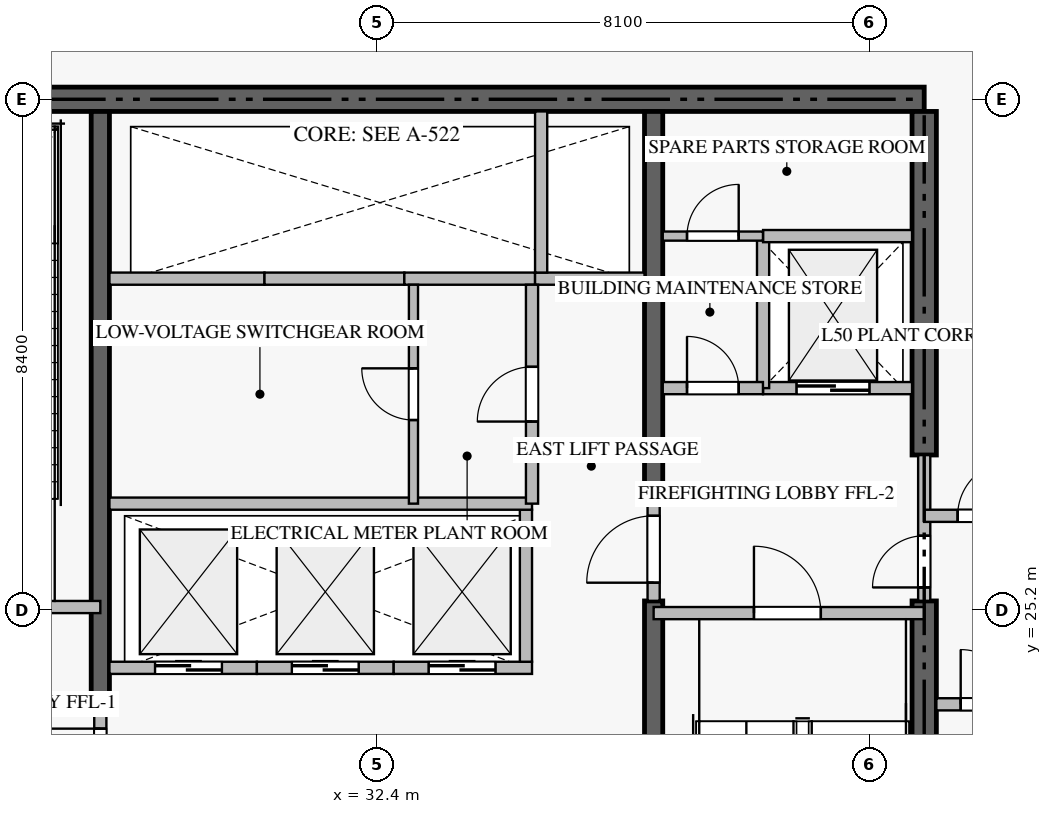
"""IFC4 building model, lengths in metres.
Left out: names, types, materials, properties, quantities, classifications, styles, units other than length and angle.
Written with IfcOpenShell. Run it as: python <this file> out.ifc"""

import sys

from ifc_helpers import new_model, si_unit, direction, frame, frame_2d, origin, place, context, subcontext, project, spatial, rectangle, extrude, source, transform, mapped, element, fill, save


model = new_model("IFC4")
c1 = context("Model", 3, precision=1e-05, world=origin(), true_north=direction((0.0, 1.0)))
c2 = subcontext(c1, "Body", "Model", "MODEL_VIEW")
j1 = project(units=[si_unit("LENGTHUNIT", "METRE"), si_unit("PLANEANGLEUNIT", "RADIAN")], contexts=[c1])
p1 = place(None, origin())
s1 = spatial("IfcSite", under=j1, at=p1, CompositionType="ELEMENT")
p2 = place(p1, origin())
s2 = spatial("IfcBuilding", under=s1, at=p2, CompositionType="ELEMENT")
p3 = place(p2, frame((0.0, 0.0, 198.9)))
s3 = spatial("IfcBuildingStorey", under=s2, at=p3, CompositionType="ELEMENT", Elevation=198.9)
p4 = place(p3, frame((41.4, 33.6, -0.44), z_axis=(0.0, 0.0, 1.0), x_axis=(-1.0, 0.0, 0.0)))
e1 = element("IfcWall", 1, at=p4, inside=s3, PredefinedType="SHEAR", context=c2, shape_type="SweptSolid", body=[
    extrude(rectangle(XDim=18.0, YDim=0.4, at=frame_2d((9.0, 0.0))), origin(), (0.0, 0.0, 1.0), 6.078),
])
p5 = place(p3, frame((41.4, 17.0, -0.44), z_axis=(0.0, 0.0, 1.0), x_axis=(0.0, 1.0, 0.0)))
e2 = element("IfcWall", 2, at=p5, inside=s3, PredefinedType="SHEAR", context=c2, shape_type="SweptSolid", body=[
    extrude(rectangle(XDim=8.35, YDim=0.4, at=frame_2d((4.175, 0.0))), origin(), (0.0, 0.0, 1.0), 6.078),
])
p6 = place(p3, frame((41.4, 27.75, -0.44), z_axis=(0.0, 0.0, 1.0), x_axis=(0.0, 1.0, 0.0)))
e3 = element("IfcWall", 3, at=p6, inside=s3, PredefinedType="SHEAR", context=c2, shape_type="SweptSolid", body=[
    extrude(rectangle(XDim=5.65, YDim=0.4, at=frame_2d((2.825, 0.0))), origin(), (0.0, 0.0, 1.0), 6.078),
])
p7 = place(p3, frame((27.85, 23.55, -0.44), z_axis=(0.0, 0.0, 1.0), x_axis=(0.0, 1.0, 0.0)))
e4 = element("IfcWall", 4, at=p7, inside=s3, PredefinedType="SHEAR", context=c2, shape_type="SweptSolid", body=[
    extrude(rectangle(XDim=9.85, YDim=0.3, at=frame_2d((4.925, 0.0))), origin(), (0.0, 0.0, 1.0), 6.078),
])
p8 = place(p3, frame((36.95, 17.0, -0.44), z_axis=(0.0, 0.0, 1.0), x_axis=(0.0, 1.0, 0.0)))
e5 = element("IfcWall", 5, at=p8, inside=s3, PredefinedType="SHEAR", context=c2, shape_type="SweptSolid", body=[
    extrude(rectangle(XDim=8.35, YDim=0.3, at=frame_2d((4.175, 0.0))), origin(), (0.0, 0.0, 1.0), 6.078),
])
p9 = place(p3, frame((36.95, 27.05, -0.44), z_axis=(0.0, 0.0, 1.0), x_axis=(0.0, 1.0, 0.0)))
e6 = element("IfcWall", 6, at=p9, inside=s3, PredefinedType="SHEAR", context=c2, shape_type="SweptSolid", body=[
    extrude(rectangle(XDim=6.35, YDim=0.3, at=frame_2d((3.175, 0.0))), origin(), (0.0, 0.0, 1.0), 6.078),
])
p10 = place(p3, frame((23.4, 25.25, 0.0), z_axis=(0.0, 0.0, 1.0), x_axis=(1.0, 0.0, 0.0)))
e7 = element("IfcWall", 7, at=p10, inside=s3, PredefinedType="STANDARD", context=c2, shape_type="SweptSolid", body=[
    extrude(rectangle(XDim=4.45, YDim=0.2, at=frame_2d((2.225, 0.0))), origin(), (0.0, 0.0, 1.0), 5.64),
])
p11 = place(p10, frame((1.65, 0.0, 0.0)))
e8 = element("IfcOpeningElement", 8, at=p11, cuts=e7, PredefinedType="OPENING", context=c2, shape_type="SweptSolid", body=[
    extrude(rectangle(XDim=1.1, YDim=2.15, at=frame_2d((0.55, 1.075))), frame((0.0, 0.11, 0.0), z_axis=(0.0, -1.0, 0.0), x_axis=(1.0, 0.0, 0.0)), (0.0, 0.0, 1.0), 0.22),
])
p12 = place(p3, frame((36.95, 25.15, 0.0), z_axis=(0.0, 0.0, 1.0), x_axis=(1.0, 0.0, 0.0)))
e9 = element("IfcWall", 9, at=p12, inside=s3, PredefinedType="STANDARD", context=c2, shape_type="SweptSolid", body=[
    extrude(rectangle(XDim=4.45, YDim=0.2, at=frame_2d((2.225, 0.0))), origin(), (0.0, 0.0, 1.0), 5.64),
])
p13 = place(p12, frame((1.65, 0.0, 0.0)))
e10 = element("IfcOpeningElement", 10, at=p13, cuts=e9, PredefinedType="OPENING", context=c2, shape_type="SweptSolid", body=[
    extrude(rectangle(XDim=1.1, YDim=2.15, at=frame_2d((0.55, 1.075))), frame((0.0, 0.11, 0.0), z_axis=(0.0, -1.0, 0.0), x_axis=(1.0, 0.0, 0.0)), (0.0, 0.0, 1.0), 0.22),
])
p14 = place(p3, frame((38.75, 28.85, 0.0), z_axis=(0.0, 0.0, 1.0), x_axis=(1.0, 0.0, 0.0)))
e11 = element("IfcWall", 11, at=p14, inside=s3, PredefinedType="STANDARD", context=c2, shape_type="SweptSolid", body=[
    extrude(rectangle(XDim=2.45, YDim=0.2, at=frame_2d((1.225, 0.0))), origin(), (0.0, 0.0, 1.0), 5.64),
])
p15 = place(p14, frame((0.55, 0.0, 0.0)))
e12 = element("IfcOpeningElement", 12, at=p15, cuts=e11, PredefinedType="OPENING", context=c2, shape_type="SweptSolid", body=[
    extrude(rectangle(XDim=1.2, YDim=2.2, at=frame_2d((0.6, 1.1))), frame((0.0, 0.11, 0.0), z_axis=(0.0, -1.0, 0.0), x_axis=(1.0, 0.0, 0.0)), (0.0, 0.0, 1.0), 0.22),
])
p16 = place(p3, frame((28.0, 24.25, 0.0), z_axis=(0.0, 0.0, 1.0), x_axis=(1.0, 0.0, 0.0)))
e13 = element("IfcWall", 13, at=p16, inside=s3, PredefinedType="STANDARD", context=c2, shape_type="SweptSolid", body=[
    extrude(rectangle(XDim=2.425, YDim=0.2, at=frame_2d((1.212, 0.0))), origin(), (0.0, 0.0, 1.0), 5.64),
])
p17 = place(p16, frame((0.75, 0.0, 0.0)))
e14 = element("IfcOpeningElement", 14, at=p17, cuts=e13, PredefinedType="OPENING", context=c2, shape_type="SweptSolid", body=[
    extrude(rectangle(XDim=1.1, YDim=2.2, at=frame_2d((0.55, 1.1))), frame((0.0, 0.11, 0.0), z_axis=(0.0, -1.0, 0.0), x_axis=(1.0, 0.0, 0.0)), (0.0, 0.0, 1.0), 0.22),
])
p18 = place(p3, frame((30.425, 24.25, 0.0), z_axis=(0.0, 0.0, 1.0), x_axis=(1.0, 0.0, 0.0)))
e15 = element("IfcWall", 15, at=p18, inside=s3, PredefinedType="STANDARD", context=c2, shape_type="SweptSolid", body=[
    extrude(rectangle(XDim=2.25, YDim=0.2, at=frame_2d((1.125, 0.0))), origin(), (0.0, 0.0, 1.0), 5.64),
])
p19 = place(p18, frame((0.575, 0.0, 0.0)))
e16 = element("IfcOpeningElement", 16, at=p19, cuts=e15, PredefinedType="OPENING", context=c2, shape_type="SweptSolid", body=[
    extrude(rectangle(XDim=1.1, YDim=2.2, at=frame_2d((0.55, 1.1))), frame((0.0, 0.11, 0.0), z_axis=(0.0, -1.0, 0.0), x_axis=(1.0, 0.0, 0.0)), (0.0, 0.0, 1.0), 0.22),
])
p20 = place(p3, frame((32.675, 24.25, 0.0), z_axis=(0.0, 0.0, 1.0), x_axis=(1.0, 0.0, 0.0)))
e17 = element("IfcWall", 17, at=p20, inside=s3, PredefinedType="STANDARD", context=c2, shape_type="SweptSolid", body=[
    extrude(rectangle(XDim=2.275, YDim=0.2, at=frame_2d((1.137, 0.0))), origin(), (0.0, 0.0, 1.0), 5.64),
])
p21 = place(p20, frame((0.575, 0.0, 0.0)))
e18 = element("IfcOpeningElement", 18, at=p21, cuts=e17, PredefinedType="OPENING", context=c2, shape_type="SweptSolid", body=[
    extrude(rectangle(XDim=1.1, YDim=2.2, at=frame_2d((0.55, 1.1))), frame((0.0, 0.11, 0.0), z_axis=(0.0, -1.0, 0.0), x_axis=(1.0, 0.0, 0.0)), (0.0, 0.0, 1.0), 0.22),
])
p22 = place(p3, frame((34.85, 24.35, 0.0), z_axis=(0.0, 0.0, 1.0), x_axis=(0.0, 1.0, 0.0)))
e19 = element("IfcWall", 19, at=p22, inside=s3, PredefinedType="STANDARD", context=c2, shape_type="SweptSolid", body=[
    extrude(rectangle(XDim=2.5, YDim=0.2, at=frame_2d((1.25, 0.0))), origin(), (0.0, 0.0, 1.0), 5.64),
])
p23 = place(p3, frame((28.0, 30.65, 0.0), z_axis=(0.0, 0.0, 1.0), x_axis=(1.0, 0.0, 0.0)))
e20 = element("IfcWall", 20, at=p23, inside=s3, PredefinedType="STANDARD", context=c2, shape_type="SweptSolid", body=[
    extrude(rectangle(XDim=2.55, YDim=0.2, at=frame_2d((1.275, 0.0))), origin(), (0.0, 0.0, 1.0), 5.64),
])
p24 = place(p3, frame((30.55, 30.65, 0.0), z_axis=(0.0, 0.0, 1.0), x_axis=(1.0, 0.0, 0.0)))
e21 = element("IfcWall", 21, at=p24, inside=s3, PredefinedType="STANDARD", context=c2, shape_type="SweptSolid", body=[
    extrude(rectangle(XDim=2.3, YDim=0.2, at=frame_2d((1.15, 0.0))), origin(), (0.0, 0.0, 1.0), 5.64),
])
p25 = place(p3, frame((32.85, 30.65, 0.0), z_axis=(0.0, 0.0, 1.0), x_axis=(1.0, 0.0, 0.0)))
e22 = element("IfcWall", 22, at=p25, inside=s3, PredefinedType="STANDARD", context=c2, shape_type="SweptSolid", body=[
    extrude(rectangle(XDim=2.15, YDim=0.2, at=frame_2d((1.075, 0.0))), origin(), (0.0, 0.0, 1.0), 5.64),
])
p26 = place(p3, frame((35.0, 30.65, 0.0), z_axis=(0.0, 0.0, 1.0), x_axis=(1.0, 0.0, 0.0)))
e23 = element("IfcWall", 23, at=p26, inside=s3, PredefinedType="STANDARD", context=c2, shape_type="SweptSolid", body=[
    extrude(rectangle(XDim=1.8, YDim=0.2, at=frame_2d((0.9, 0.0))), origin(), (0.0, 0.0, 1.0), 5.64),
])
p27 = place(p3, frame((35.1, 30.75, 0.0), z_axis=(0.0, 0.0, 1.0), x_axis=(0.0, 1.0, 0.0)))
e24 = element("IfcWall", 24, at=p27, inside=s3, PredefinedType="STANDARD", context=c2, shape_type="SweptSolid", body=[
    extrude(rectangle(XDim=2.65, YDim=0.2, at=frame_2d((1.325, 0.0))), origin(), (0.0, 0.0, 1.0), 5.64),
])
p28 = place(p3, frame((38.75, 28.85, 0.0), z_axis=(0.0, 0.0, 1.0), x_axis=(0.0, 1.0, 0.0)))
e25 = element("IfcWall", 25, at=p28, inside=s3, PredefinedType="STANDARD", context=c2, shape_type="SweptSolid", body=[
    extrude(rectangle(XDim=2.5, YDim=0.2, at=frame_2d((1.25, 0.0))), origin(), (0.0, 0.0, 1.0), 5.64),
])
p29 = place(p3, frame((38.75, 31.35, 0.0), z_axis=(0.0, 0.0, 1.0), x_axis=(1.0, 0.0, 0.0)))
e26 = element("IfcWall", 26, at=p29, inside=s3, PredefinedType="STANDARD", context=c2, shape_type="SweptSolid", body=[
    extrude(rectangle(XDim=2.45, YDim=0.2, at=frame_2d((1.225, 0.0))), origin(), (0.0, 0.0, 1.0), 5.64),
])
p30 = place(p3, frame((37.1, 28.85, 0.0), z_axis=(0.0, 0.0, 1.0), x_axis=(1.0, 0.0, 0.0)))
e27 = element("IfcWall", 27, at=p30, inside=s3, PredefinedType="STANDARD", context=c2, shape_type="SweptSolid", body=[
    extrude(rectangle(XDim=1.648, YDim=0.2, at=frame_2d((0.824, 0.0))), origin(), (0.0, 0.0, 1.0), 5.64),
])
p31 = place(p30, frame((0.399, 0.0, 0.0)))
e28 = element("IfcOpeningElement", 28, at=p31, cuts=e27, PredefinedType="OPENING", context=c2, shape_type="SweptSolid", body=[
    extrude(rectangle(XDim=0.85, YDim=2.1, at=frame_2d((0.425, 1.05))), frame((0.0, 0.11, 0.0), z_axis=(0.0, -1.0, 0.0), x_axis=(1.0, 0.0, 0.0)), (0.0, 0.0, 1.0), 0.22),
])
p32 = place(p3, frame((41.4, 25.352, 0.0), z_axis=(0.0, 0.0, 1.0), x_axis=(0.0, 1.0, 0.0)))
e29 = element("IfcWall", 29, at=p32, inside=s3, PredefinedType="STANDARD", context=c2, shape_type="SweptSolid", body=[
    extrude(rectangle(XDim=2.396, YDim=0.2, at=frame_2d((1.198, 0.0))), origin(), (0.0, 0.0, 1.0), 5.64),
])
p33 = place(p32, frame((0.22, 0.0, 0.0)))
e30 = element("IfcOpeningElement", 30, at=p33, cuts=e29, PredefinedType="OPENING", context=c2, shape_type="SweptSolid", body=[
    extrude(rectangle(XDim=0.85, YDim=2.1, at=frame_2d((0.425, 1.05))), frame((0.0, 0.11, 0.0), z_axis=(0.0, -1.0, 0.0), x_axis=(1.0, 0.0, 0.0)), (0.0, 0.0, 1.0), 0.22),
])
p34 = place(p3, frame((27.85, 21.852, 0.0), z_axis=(0.0, 0.0, 1.0), x_axis=(0.0, 1.0, 0.0)))
e31 = element("IfcWall", 31, at=p34, inside=s3, PredefinedType="STANDARD", context=c2, shape_type="SweptSolid", body=[
    extrude(rectangle(XDim=1.696, YDim=0.2, at=frame_2d((0.848, 0.0))), origin(), (0.0, 0.0, 1.0), 5.64),
])
p35 = place(p34, frame((0.298, 0.0, 0.0)))
e32 = element("IfcOpeningElement", 32, at=p35, cuts=e31, PredefinedType="OPENING", context=c2, shape_type="SweptSolid", body=[
    extrude(rectangle(XDim=1.1, YDim=2.15, at=frame_2d((0.55, 1.075))), frame((0.0, 0.11, 0.0), z_axis=(0.0, -1.0, 0.0), x_axis=(1.0, 0.0, 0.0)), (0.0, 0.0, 1.0), 0.22),
])
p36 = place(p3, frame((36.95, 25.352, 0.0), z_axis=(0.0, 0.0, 1.0), x_axis=(0.0, 1.0, 0.0)))
e33 = element("IfcWall", 33, at=p36, inside=s3, PredefinedType="STANDARD", context=c2, shape_type="SweptSolid", body=[
    extrude(rectangle(XDim=1.696, YDim=0.2, at=frame_2d((0.848, 0.0))), origin(), (0.0, 0.0, 1.0), 5.64),
])
p37 = place(p36, frame((0.298, 0.0, 0.0)))
e34 = element("IfcOpeningElement", 34, at=p37, cuts=e33, PredefinedType="OPENING", context=c2, shape_type="SweptSolid", body=[
    extrude(rectangle(XDim=1.1, YDim=2.15, at=frame_2d((0.55, 1.075))), frame((0.0, 0.11, 0.0), z_axis=(0.0, -1.0, 0.0), x_axis=(1.0, 0.0, 0.0)), (0.0, 0.0, 1.0), 0.22),
])
p38 = place(p3, frame((28.0, 26.95, 0.0), z_axis=(0.0, 0.0, 1.0), x_axis=(1.0, 0.0, 0.0)))
e35 = element("IfcWall", 35, at=p38, inside=s3, PredefinedType="STANDARD", context=c2, shape_type="SweptSolid", body=[
    extrude(rectangle(XDim=6.95, YDim=0.2, at=frame_2d((3.475, 0.0))), origin(), (0.0, 0.0, 1.0), 5.64),
])
p39 = place(p3, frame((37.1, 31.35, 0.0), z_axis=(0.0, 0.0, 1.0), x_axis=(1.0, 0.0, 0.0)))
e36 = element("IfcWall", 36, at=p39, inside=s3, PredefinedType="PARTITIONING", context=c2, shape_type="SweptSolid", body=[
    extrude(rectangle(XDim=1.648, YDim=0.15, at=frame_2d((0.824, 0.0))), origin(), (0.0, 0.0, 1.0), 5.64),
])
p40 = place(p39, frame((0.399, 0.0, 0.0)))
e37 = element("IfcOpeningElement", 37, at=p40, cuts=e36, PredefinedType="OPENING", context=c2, shape_type="SweptSolid", body=[
    extrude(rectangle(XDim=0.85, YDim=2.1, at=frame_2d((0.425, 1.05))), frame((0.0, 0.085, 0.0), z_axis=(0.0, -1.0, 0.0), x_axis=(1.0, 0.0, 0.0)), (0.0, 0.0, 1.0), 0.17),
])
p41 = place(p3, frame((34.95, 26.95, 0.0), z_axis=(0.0, 0.0, 1.0), x_axis=(0.0, 1.0, 0.0)))
e38 = element("IfcWall", 38, at=p41, inside=s3, PredefinedType="STANDARD", context=c2, shape_type="SweptSolid", body=[
    extrude(rectangle(XDim=3.6, YDim=0.2, at=frame_2d((1.8, 0.0))), origin(), (0.0, 0.0, 1.0), 5.64),
])
p42 = place(p41, frame((1.35, 0.0, 0.0)))
e39 = element("IfcOpeningElement", 39, at=p42, cuts=e38, PredefinedType="OPENING", context=c2, shape_type="SweptSolid", body=[
    extrude(rectangle(XDim=0.9, YDim=2.1, at=frame_2d((0.45, 1.05))), frame((0.0, 0.11, 0.0), z_axis=(0.0, -1.0, 0.0), x_axis=(1.0, 0.0, 0.0)), (0.0, 0.0, 1.0), 0.22),
])
p43 = place(p3, frame((33.0, 26.95, 0.0), z_axis=(0.0, 0.0, 1.0), x_axis=(0.0, 1.0, 0.0)))
e40 = element("IfcWall", 40, at=p43, inside=s3, PredefinedType="PARTITIONING", context=c2, shape_type="SweptSolid", body=[
    extrude(rectangle(XDim=3.6, YDim=0.15, at=frame_2d((1.8, 0.0))), origin(), (0.0, 0.0, 1.0), 5.64),
])
p44 = place(p43, frame((1.375, 0.0, 0.0)))
e41 = element("IfcOpeningElement", 41, at=p44, cuts=e40, PredefinedType="OPENING", context=c2, shape_type="SweptSolid", body=[
    extrude(rectangle(XDim=0.85, YDim=2.1, at=frame_2d((0.425, 1.05))), frame((0.0, 0.085, 0.0), z_axis=(0.0, -1.0, 0.0), x_axis=(1.0, 0.0, 0.0)), (0.0, 0.0, 1.0), 0.17),
])
p45 = place(p3, frame((41.6, 23.65, 0.0), z_axis=(0.0, 0.0, 1.0), x_axis=(1.0, 0.0, 0.0)))
e42 = element("IfcWall", 42, at=p45, inside=s3, PredefinedType="STANDARD", context=c2, shape_type="SweptSolid", body=[
    extrude(rectangle(XDim=1.8, YDim=0.2, at=frame_2d((0.9, 0.0))), origin(), (0.0, 0.0, 1.0), 5.64),
])
p46 = place(p45, frame((0.4, 0.0, 0.0)))
e43 = element("IfcOpeningElement", 43, at=p46, cuts=e42, PredefinedType="OPENING", context=c2, shape_type="SweptSolid", body=[
    extrude(rectangle(XDim=0.9, YDim=2.1, at=frame_2d((0.45, 1.05))), frame((0.0, 0.11, 0.0), z_axis=(0.0, -1.0, 0.0), x_axis=(1.0, 0.0, 0.0)), (0.0, 0.0, 1.0), 0.22),
])
p47 = place(p3, frame((41.4, 26.75, 0.0), z_axis=(0.0, 0.0, 1.0), x_axis=(1.0, 0.0, 0.0)))
e44 = element("IfcWall", 44, at=p47, inside=s3, PredefinedType="STANDARD", context=c2, shape_type="SweptSolid", body=[
    extrude(rectangle(XDim=2.0, YDim=0.2, at=frame_2d((1.0, 0.0))), origin(), (0.0, 0.0, 1.0), 5.64),
])
p48 = place(p47, frame((0.55, 0.0, 0.0)))
e45 = element("IfcOpeningElement", 45, at=p48, cuts=e44, PredefinedType="OPENING", context=c2, shape_type="SweptSolid", body=[
    extrude(rectangle(XDim=0.9, YDim=2.1, at=frame_2d((0.45, 1.05))), frame((0.0, 0.11, 0.0), z_axis=(0.0, -1.0, 0.0), x_axis=(1.0, 0.0, 0.0)), (0.0, 0.0, 1.0), 0.22),
])
m1 = source(origin(), c2, "Body", "SweptSolid", [
    extrude(rectangle(XDim=1.1, YDim=2.15, at=frame_2d((0.55, 1.075))), frame((0.0, 0.025, 0.0), z_axis=(0.0, -1.0, 0.0), x_axis=(1.0, 0.0, 0.0)), (0.0, 0.0, 1.0), 0.05),
])
p49 = place(p13, origin())
e46 = element("IfcDoor", 46, at=p49, inside=s3, OperationType="SINGLE_SWING_LEFT", PredefinedType="DOOR", context=c2, shape_type="MappedRepresentation", body=[
    mapped(m1, transform((0.0, 0.0, 0.0), scale=1.0)),
])
fill(e10, e46)
m2 = source(origin(), c2, "Body", "SweptSolid", [
    extrude(rectangle(XDim=1.2, YDim=2.2, at=frame_2d((0.6, 1.1))), frame((0.0, 0.025, 0.0), z_axis=(0.0, -1.0, 0.0), x_axis=(1.0, 0.0, 0.0)), (0.0, 0.0, 1.0), 0.05),
])
p50 = place(p15, origin())
e47 = element("IfcDoor", 47, at=p50, inside=s3, OperationType="DOUBLE_DOOR_SLIDING", PredefinedType="DOOR", context=c2, shape_type="MappedRepresentation", body=[
    mapped(m2, transform((0.0, 0.0, 0.0), scale=1.0)),
])
fill(e12, e47)
m3 = source(origin(), c2, "Body", "SweptSolid", [
    extrude(rectangle(XDim=1.1, YDim=2.2, at=frame_2d((0.55, 1.1))), frame((0.0, 0.025, 0.0), z_axis=(0.0, -1.0, 0.0), x_axis=(1.0, 0.0, 0.0)), (0.0, 0.0, 1.0), 0.05),
])
p51 = place(p17, origin())
e48 = element("IfcDoor", 48, at=p51, inside=s3, OperationType="DOUBLE_DOOR_SLIDING", PredefinedType="DOOR", context=c2, shape_type="MappedRepresentation", body=[
    mapped(m3, transform((0.0, 0.0, 0.0), scale=1.0)),
])
fill(e14, e48)
p52 = place(p19, origin())
e49 = element("IfcDoor", 49, at=p52, inside=s3, OperationType="DOUBLE_DOOR_SLIDING", PredefinedType="DOOR", context=c2, shape_type="MappedRepresentation", body=[
    mapped(m3, transform((0.0, 0.0, 0.0), scale=1.0)),
])
fill(e16, e49)
p53 = place(p21, origin())
e50 = element("IfcDoor", 50, at=p53, inside=s3, OperationType="DOUBLE_DOOR_SLIDING", PredefinedType="DOOR", context=c2, shape_type="MappedRepresentation", body=[
    mapped(m3, transform((0.0, 0.0, 0.0), scale=1.0)),
])
fill(e18, e50)
m4 = source(origin(), c2, "Body", "SweptSolid", [
    extrude(rectangle(XDim=0.85, YDim=2.1, at=frame_2d((0.425, 1.05))), frame((0.0, 0.025, 0.0), z_axis=(0.0, -1.0, 0.0), x_axis=(1.0, 0.0, 0.0)), (0.0, 0.0, 1.0), 0.05),
])
p54 = place(p31, origin())
e51 = element("IfcDoor", 51, at=p54, inside=s3, OperationType="SINGLE_SWING_LEFT", PredefinedType="DOOR", context=c2, shape_type="MappedRepresentation", body=[
    mapped(m4, transform((0.0, 0.0, 0.0), scale=1.0)),
])
fill(e28, e51)
p55 = place(p33, origin())
e52 = element("IfcDoor", 52, at=p55, inside=s3, OperationType="SINGLE_SWING_LEFT", PredefinedType="DOOR", context=c2, shape_type="MappedRepresentation", body=[
    mapped(m4, transform((0.0, 0.0, 0.0), scale=1.0)),
])
fill(e30, e52)
p56 = place(p35, origin())
e53 = element("IfcDoor", 53, at=p56, inside=s3, OperationType="SINGLE_SWING_RIGHT", PredefinedType="DOOR", context=c2, shape_type="MappedRepresentation", body=[
    mapped(m1, transform((0.0, 0.0, 0.0), scale=1.0)),
])
fill(e32, e53)
p57 = place(p37, origin())
e54 = element("IfcDoor", 54, at=p57, inside=s3, OperationType="SINGLE_SWING_LEFT", PredefinedType="DOOR", context=c2, shape_type="MappedRepresentation", body=[
    mapped(m1, transform((0.0, 0.0, 0.0), scale=1.0)),
])
fill(e34, e54)
p58 = place(p40, origin())
e55 = element("IfcDoor", 55, at=p58, inside=s3, OperationType="SINGLE_SWING_RIGHT", PredefinedType="DOOR", context=c2, shape_type="MappedRepresentation", body=[
    mapped(m4, transform((0.0, 0.0, 0.0), scale=1.0)),
])
fill(e37, e55)
m5 = source(origin(), c2, "Body", "SweptSolid", [
    extrude(rectangle(XDim=0.9, YDim=2.1, at=frame_2d((0.45, 1.05))), frame((0.0, 0.025, 0.0), z_axis=(0.0, -1.0, 0.0), x_axis=(1.0, 0.0, 0.0)), (0.0, 0.0, 1.0), 0.05),
])
p59 = place(p42, origin())
e56 = element("IfcDoor", 56, at=p59, inside=s3, OperationType="SINGLE_SWING_LEFT", PredefinedType="DOOR", context=c2, shape_type="MappedRepresentation", body=[
    mapped(m5, transform((0.0, 0.0, 0.0), scale=1.0)),
])
fill(e39, e56)
p60 = place(p44, origin())
e57 = element("IfcDoor", 57, at=p60, inside=s3, OperationType="SINGLE_SWING_RIGHT", PredefinedType="DOOR", context=c2, shape_type="MappedRepresentation", body=[
    mapped(m4, transform((0.0, 0.0, 0.0), scale=1.0)),
])
fill(e41, e57)
p61 = place(p46, origin())
e58 = element("IfcDoor", 58, at=p61, inside=s3, OperationType="SINGLE_SWING_LEFT", PredefinedType="DOOR", context=c2, shape_type="MappedRepresentation", body=[
    mapped(m5, transform((0.0, 0.0, 0.0), scale=1.0)),
])
fill(e43, e58)
p62 = place(p48, origin())
e59 = element("IfcDoor", 59, at=p62, inside=s3, OperationType="SINGLE_SWING_RIGHT", PredefinedType="DOOR", context=c2, shape_type="MappedRepresentation", body=[
    mapped(m5, transform((0.0, 0.0, 0.0), scale=1.0)),
])
fill(e45, e59)
save(model, sys.argv[1])
